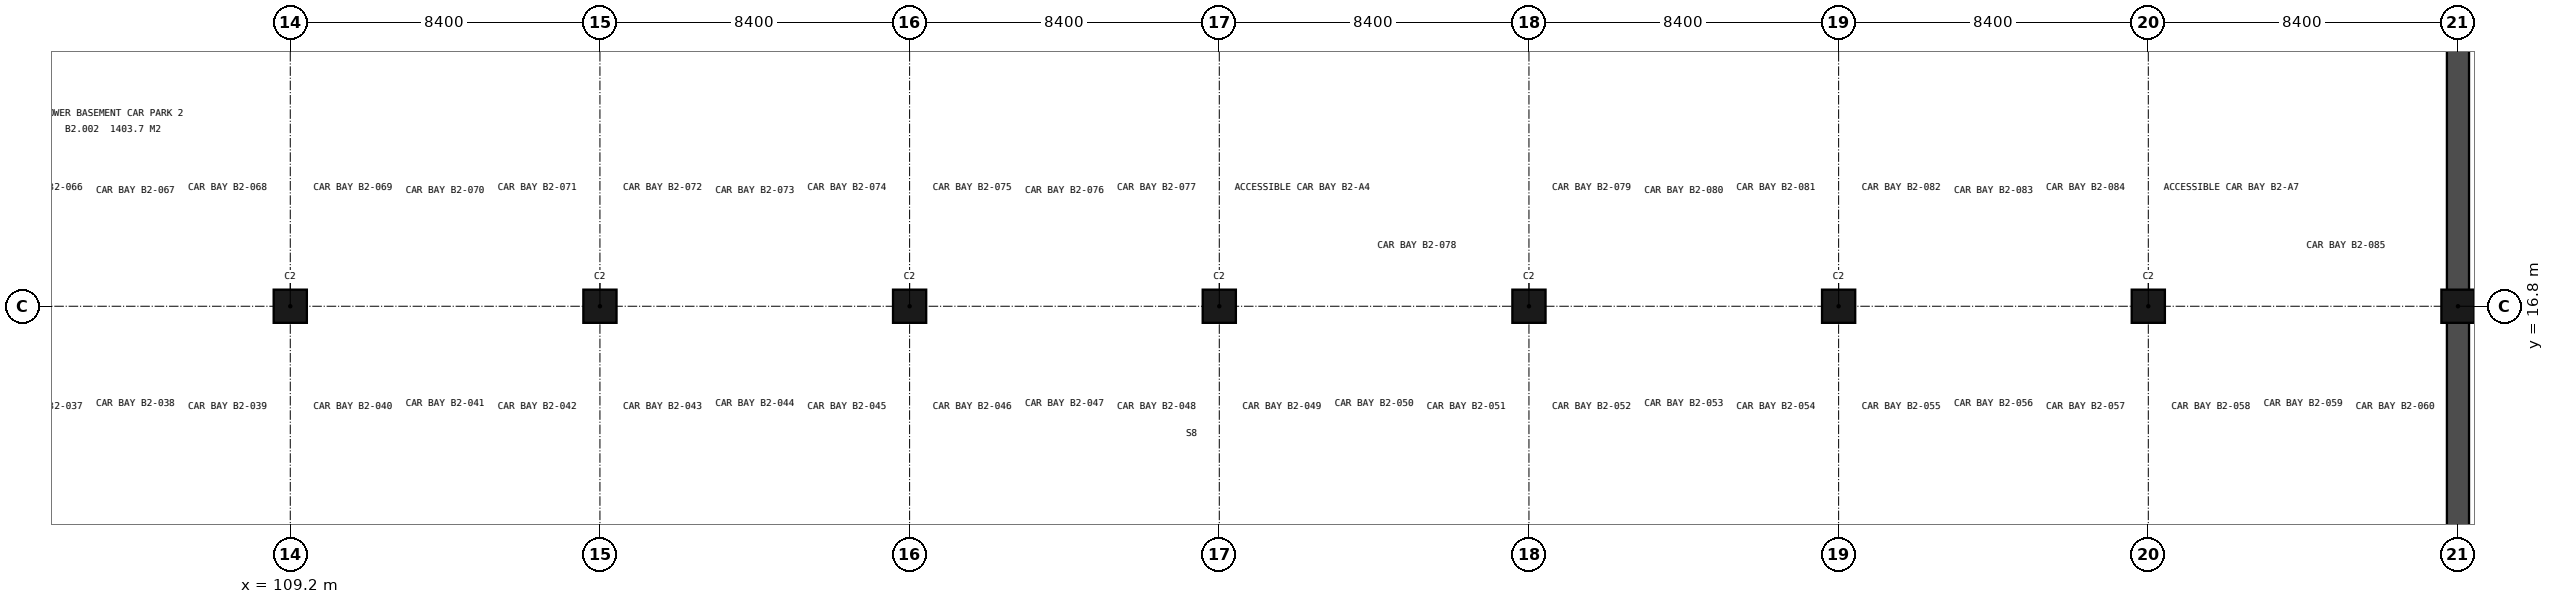
"""IFC4 building model, lengths in metres.
Left out: names, types, materials, properties, quantities, classifications, styles, units other than length and angle.
Written with IfcOpenShell. Run it as: python <this file> out.ifc"""

import sys

from ifc_helpers import new_model, si_unit, direction, frame, frame_2d, origin, origin_2d, place, context, subcontext, project, spatial, rectangle, extrude, element, save


model = new_model("IFC4")
c1 = context("Model", 3, precision=1e-05, world=origin(), true_north=direction((0.0, 1.0)))
c2 = subcontext(c1, "Body", "Model", "MODEL_VIEW")
j1 = project(units=[si_unit("LENGTHUNIT", "METRE"), si_unit("PLANEANGLEUNIT", "RADIAN")], contexts=[c1])
p1 = place(None, origin())
s1 = spatial("IfcSite", under=j1, at=p1, CompositionType="ELEMENT")
p2 = place(p1, origin())
s2 = spatial("IfcBuilding", under=s1, at=p2, CompositionType="ELEMENT")
p3 = place(p2, frame((0.0, 0.0, -9.6)))
s3 = spatial("IfcBuildingStorey", under=s2, at=p3, CompositionType="ELEMENT", Elevation=-9.6)
for number, where, z_axis, x_axis in (
    (1, (109.2, 16.8, -0.25), (0.0, 0.0, 1.0), (1.0, 0.0, 0.0)),
    (2, (117.6, 16.8, -0.25), (0.0, 0.0, 1.0), (1.0, 0.0, 0.0)),
    (3, (126.0, 16.8, -0.25), (0.0, 0.0, 1.0), (1.0, 0.0, 0.0)),
    (4, (134.4, 16.8, -0.25), (0.0, 0.0, 1.0), (1.0, 0.0, 0.0)),
    (5, (142.8, 16.8, -0.25), (0.0, 0.0, 1.0), (1.0, 0.0, 0.0)),
    (6, (151.2, 16.8, -0.25), (0.0, 0.0, 1.0), (1.0, 0.0, 0.0)),
    (7, (159.6, 16.8, -0.25), (0.0, 0.0, 1.0), (1.0, 0.0, 0.0)),
    (8, (168.0, 16.8, -0.25), (0.0, 0.0, 1.0), (1.0, 0.0, 0.0)),
):
    element("IfcColumn", number, at=place(p3, frame(where, z_axis=z_axis, x_axis=x_axis)), inside=s3, PredefinedType="COLUMN", context=c2, shape_type="SweptSolid", body=[
        extrude(rectangle(XDim=0.9, YDim=0.9, at=origin_2d()), origin(), (0.0, 0.0, 1.0), 4.75),
    ])
p4 = place(p3, frame((168.0, -0.3, -0.25), z_axis=(0.0, 0.0, 1.0), x_axis=(0.0, 1.0, 0.0)))
e9 = element("IfcWall", 9, at=p4, inside=s3, PredefinedType="SOLIDWALL", context=c2, shape_type="SweptSolid", body=[
    extrude(rectangle(XDim=118.2, YDim=0.6, at=frame_2d((59.1, 0.0))), origin(), (0.0, 0.0, 1.0), 4.75),
])
save(model, sys.argv[1])
